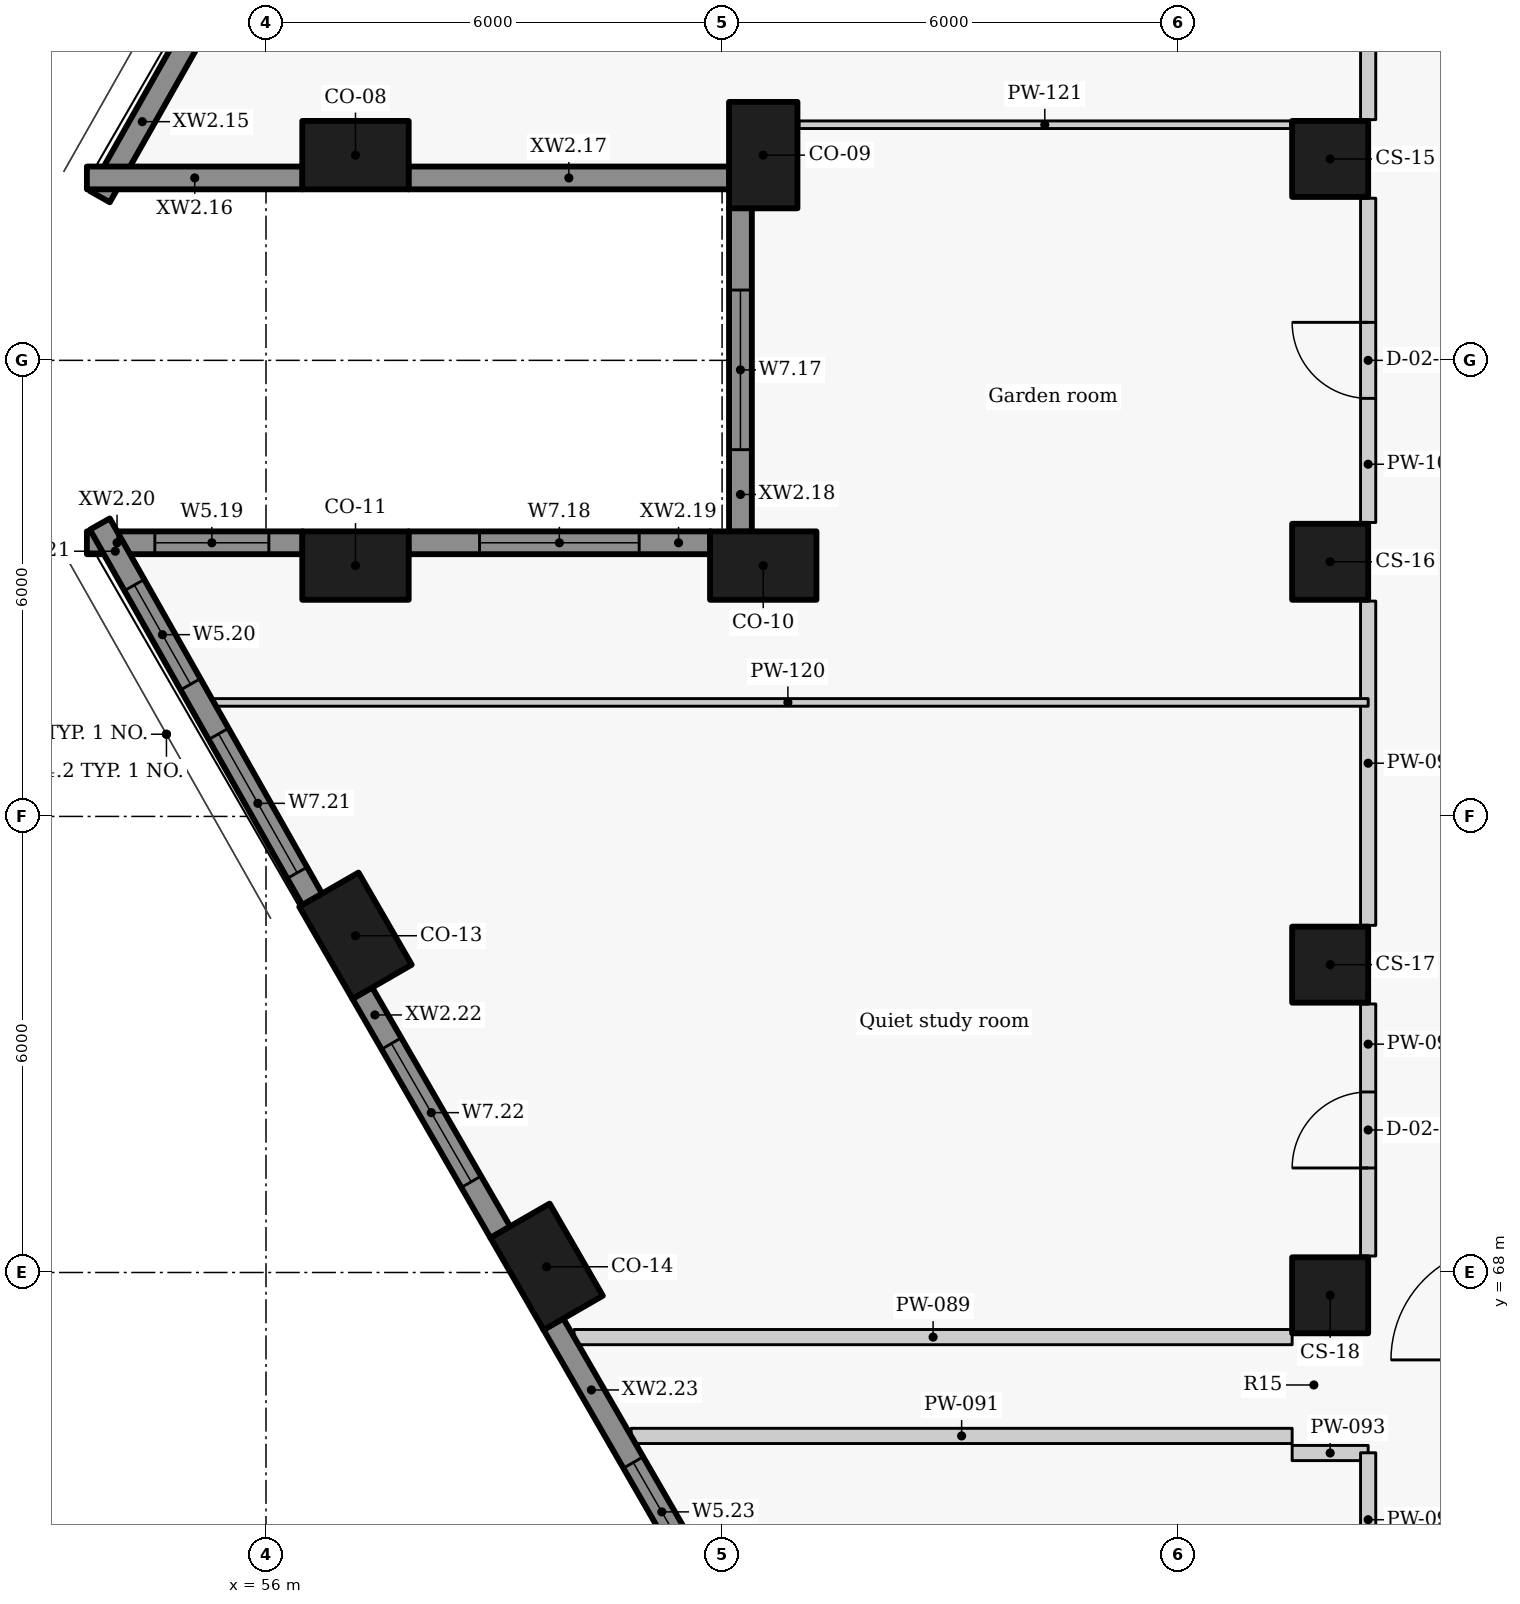
"""IFC4 building model, lengths in metres.
Left out: names, types, materials, properties, quantities, classifications, styles, units other than length and angle.
Written with IfcOpenShell. Run it as: python <this file> out.ifc"""

import sys

from ifc_helpers import new_model, si_unit, direction, frame, frame_2d, origin, origin_2d, place, context, subcontext, project, spatial, rectangle, extrude, element, fill, save


model = new_model("IFC4")
c1 = context("Model", 3, precision=1e-05, world=origin(), true_north=direction((0.0, 1.0)))
c2 = subcontext(c1, "Body", "Model", "MODEL_VIEW")
j1 = project(units=[si_unit("LENGTHUNIT", "METRE"), si_unit("PLANEANGLEUNIT", "RADIAN")], contexts=[c1])
p1 = place(None, origin())
s1 = spatial("IfcSite", under=j1, at=p1, CompositionType="ELEMENT")
p2 = place(p1, origin())
s2 = spatial("IfcBuilding", under=s1, at=p2, CompositionType="ELEMENT")
p3 = place(p2, frame((0.0, 0.0, 81.0)))
s3 = spatial("IfcBuildingStorey", under=s2, at=p3, CompositionType="ELEMENT", Elevation=81.0)
for number, where, z_axis, x_axis in (
    (1, (57.177, 82.7, 0.0), (0.0, 0.0, 1.0), (1.0, 0.0, 0.0)),
    (2, (62.542, 82.7, 0.0), (0.0, 0.0, 1.0), (0.0, -1.0, 0.0)),
    (3, (62.542, 77.3, 0.0), (0.0, 0.0, 1.0), (-1.0, 0.0, 0.0)),
    (4, (57.177, 77.3, 0.0), (0.0, 0.0, 1.0), (-1.0, 0.0, 0.0)),
    (5, (57.177, 72.43, 0.0), (0.0, 0.0, 1.0), (0.5, -0.866, 0.0)),
    (6, (59.692, 68.075, 0.0), (0.0, 0.0, 1.0), (0.5, -0.866, 0.0)),
):
    element("IfcColumn", number, at=place(p3, frame(where, z_axis=z_axis, x_axis=x_axis)), inside=s3, PredefinedType="COLUMN", context=c2, shape_type="SweptSolid", body=[
        extrude(rectangle(XDim=1.4, YDim=0.9, at=origin_2d()), origin(), (0.0, 0.0, 1.0), 3.3),
    ])
for number, where, z_axis, x_axis in (
    (7, (70.0, 82.65, 0.0), (0.0, 0.0, 1.0), (0.0, -1.0, 0.0)),
    (8, (70.0, 77.35, 0.0), (0.0, 0.0, 1.0), (0.0, -1.0, 0.0)),
    (9, (70.0, 72.05, 0.0), (0.0, 0.0, 1.0), (0.0, -1.0, 0.0)),
    (10, (70.0, 67.7, 0.0), (0.0, 0.0, 1.0), (0.0, -1.0, 0.0)),
):
    element("IfcColumn", number, at=place(p3, frame(where, z_axis=z_axis, x_axis=x_axis)), inside=s3, PredefinedType="COLUMN", context=c2, shape_type="SweptSolid", body=[
        extrude(rectangle(XDim=1.0, YDim=1.0, at=origin_2d()), origin(), (0.0, 0.0, 1.0), 3.3),
    ])
p4 = place(p3, frame((56.609, 87.094, 0.0), z_axis=(0.0, 0.0, 1.0), x_axis=(-0.492456858874, -0.870336855561, 0.0)))
e11 = element("IfcWall", 11, at=p4, inside=s3, PredefinedType="SOLIDWALL", context=c2, shape_type="SweptSolid", body=[
    extrude(rectangle(XDim=5.677, YDim=0.3, at=frame_2d((2.838, 0.0))), origin(), (0.0, 0.0, 1.0), 2.425),
])
p5 = place(p4, frame((1.209, 0.0, 0.9)))
e12 = element("IfcOpeningElement", 12, at=p5, cuts=e11, PredefinedType="OPENING", context=c2, shape_type="SweptSolid", body=[
    extrude(rectangle(XDim=2.1, YDim=1.1, at=frame_2d((1.05, 0.55))), frame((0.0, 0.16, 0.0), z_axis=(0.0, -1.0, 0.0), x_axis=(1.0, 0.0, 0.0)), (0.0, 0.0, 1.0), 0.32),
])
p6 = place(p3, frame((53.643, 82.4, 0.0), z_axis=(0.0, 0.0, 1.0), x_axis=(1.0, 0.0, 0.0)))
e13 = element("IfcWall", 13, at=p6, inside=s3, PredefinedType="SOLIDWALL", context=c2, shape_type="SweptSolid", body=[
    extrude(rectangle(XDim=2.838, YDim=0.3, at=frame_2d((1.419, 0.0))), origin(), (0.0, 0.0, 1.0), 2.425),
])
p7 = place(p3, frame((57.873, 82.4, 0.0), z_axis=(0.0, 0.0, 1.0), x_axis=(1.0, 0.0, 0.0)))
e14 = element("IfcWall", 14, at=p7, inside=s3, PredefinedType="SOLIDWALL", context=c2, shape_type="SweptSolid", body=[
    extrude(rectangle(XDim=4.223, YDim=0.3, at=frame_2d((2.111, 0.0))), origin(), (0.0, 0.0, 1.0), 2.425),
])
p8 = place(p3, frame((62.242, 82.004, 0.0), z_axis=(0.0, 0.0, 1.0), x_axis=(0.0, -1.0, 0.0)))
e15 = element("IfcWall", 15, at=p8, inside=s3, PredefinedType="SOLIDWALL", context=c2, shape_type="SweptSolid", body=[
    extrude(rectangle(XDim=4.258, YDim=0.3, at=frame_2d((2.129, 0.0))), origin(), (0.0, 0.0, 1.0), 2.425),
])
p9 = place(p8, frame((1.079, 0.0, 0.9)))
e16 = element("IfcOpeningElement", 16, at=p9, cuts=e15, PredefinedType="OPENING", context=c2, shape_type="SweptSolid", body=[
    extrude(rectangle(XDim=2.1, YDim=1.1, at=frame_2d((1.05, 0.55))), frame((0.0, 0.16, 0.0), z_axis=(0.0, -1.0, 0.0), x_axis=(1.0, 0.0, 0.0)), (0.0, 0.0, 1.0), 0.32),
])
p10 = place(p3, frame((61.846, 77.6, 0.0), z_axis=(0.0, 0.0, 1.0), x_axis=(-1.0, 0.0, 0.0)))
e17 = element("IfcWall", 17, at=p10, inside=s3, PredefinedType="SOLIDWALL", context=c2, shape_type="SweptSolid", body=[
    extrude(rectangle(XDim=3.973, YDim=0.3, at=frame_2d((1.986, 0.0))), origin(), (0.0, 0.0, 1.0), 2.425),
])
p11 = place(p10, frame((0.936, 0.0, 0.9)))
e18 = element("IfcOpeningElement", 18, at=p11, cuts=e17, PredefinedType="OPENING", context=c2, shape_type="SweptSolid", body=[
    extrude(rectangle(XDim=2.1, YDim=1.1, at=frame_2d((1.05, 0.55))), frame((0.0, 0.16, 0.0), z_axis=(0.0, -1.0, 0.0), x_axis=(1.0, 0.0, 0.0)), (0.0, 0.0, 1.0), 0.32),
])
p12 = place(p3, frame((56.481, 77.6, 0.0), z_axis=(0.0, 0.0, 1.0), x_axis=(-1.0, 0.0, 0.0)))
e19 = element("IfcWall", 19, at=p12, inside=s3, PredefinedType="SOLIDWALL", context=c2, shape_type="SweptSolid", body=[
    extrude(rectangle(XDim=2.838, YDim=0.3, at=frame_2d((1.419, 0.0))), origin(), (0.0, 0.0, 1.0), 2.425),
])
p13 = place(p12, frame((0.444, 0.0, 0.9)))
e20 = element("IfcOpeningElement", 20, at=p13, cuts=e19, PredefinedType="OPENING", context=c2, shape_type="SweptSolid", body=[
    extrude(rectangle(XDim=1.5, YDim=1.1, at=frame_2d((0.75, 0.55))), frame((0.0, 0.16, 0.0), z_axis=(0.0, -1.0, 0.0), x_axis=(1.0, 0.0, 0.0)), (0.0, 0.0, 1.0), 0.32),
])
p14 = place(p3, frame((53.814, 77.847, 0.0), z_axis=(0.0, 0.0, 1.0), x_axis=(0.492456858874, -0.870336855561, 0.0)))
e21 = element("IfcWall", 21, at=p14, inside=s3, PredefinedType="SOLIDWALL", context=c2, shape_type="SweptSolid", body=[
    extrude(rectangle(XDim=5.677, YDim=0.3, at=frame_2d((2.838, 0.0))), origin(), (0.0, 0.0, 1.0), 2.425),
])
p15 = place(p14, frame((0.922, 0.0, 0.9)))
e22 = element("IfcOpeningElement", 22, at=p15, cuts=e21, PredefinedType="OPENING", context=c2, shape_type="SweptSolid", body=[
    extrude(rectangle(XDim=1.5, YDim=1.1, at=frame_2d((0.75, 0.55))), frame((0.0, 0.16, 0.0), z_axis=(0.0, -1.0, 0.0), x_axis=(1.0, 0.0, 0.0)), (0.0, 0.0, 1.0), 0.32),
])
p16 = place(p14, frame((3.172, 0.0, 0.9)))
e23 = element("IfcOpeningElement", 23, at=p16, cuts=e21, PredefinedType="OPENING", context=c2, shape_type="SweptSolid", body=[
    extrude(rectangle(XDim=2.1, YDim=1.1, at=frame_2d((1.05, 0.55))), frame((0.0, 0.16, 0.0), z_axis=(0.0, -1.0, 0.0), x_axis=(1.0, 0.0, 0.0)), (0.0, 0.0, 1.0), 0.32),
])
p17 = place(p3, frame((57.265, 71.677, 0.0), z_axis=(0.0, 0.0, 1.0), x_axis=(0.500009139881, -0.866020126807, 0.0)))
e24 = element("IfcWall", 24, at=p17, inside=s3, PredefinedType="SOLIDWALL", context=c2, shape_type="SweptSolid", body=[
    extrude(rectangle(XDim=3.637, YDim=0.3, at=frame_2d((1.818, 0.0))), origin(), (0.0, 0.0, 1.0), 2.425),
])
p18 = place(p17, frame((0.768, 0.0, 0.9)))
e25 = element("IfcOpeningElement", 25, at=p18, cuts=e24, PredefinedType="OPENING", context=c2, shape_type="SweptSolid", body=[
    extrude(rectangle(XDim=2.1, YDim=1.1, at=frame_2d((1.05, 0.55))), frame((0.0, 0.16, 0.0), z_axis=(0.0, -1.0, 0.0), x_axis=(1.0, 0.0, 0.0)), (0.0, 0.0, 1.0), 0.32),
])
p19 = place(p3, frame((59.78, 67.323, 0.0), z_axis=(0.0, 0.0, 1.0), x_axis=(0.499957037901, -0.866050206543, 0.0)))
e26 = element("IfcWall", 26, at=p19, inside=s3, PredefinedType="SOLIDWALL", context=c2, shape_type="SweptSolid", body=[
    extrude(rectangle(XDim=3.934, YDim=0.3, at=frame_2d((1.967, 0.0))), origin(), (0.0, 0.0, 1.0), 2.425),
])
p20 = place(p19, frame((2.104, 0.0, 0.9)))
e27 = element("IfcOpeningElement", 27, at=p20, cuts=e26, PredefinedType="OPENING", context=c2, shape_type="SweptSolid", body=[
    extrude(rectangle(XDim=1.5, YDim=1.1, at=frame_2d((0.75, 0.55))), frame((0.0, 0.16, 0.0), z_axis=(0.0, -1.0, 0.0), x_axis=(1.0, 0.0, 0.0)), (0.0, 0.0, 1.0), 0.32),
])
p21 = place(p3, frame((60.052, 67.15, 0.0), z_axis=(0.0, 0.0, 1.0), x_axis=(1.0, 0.0, 0.0)))
e28 = element("IfcWall", 28, at=p21, inside=s3, PredefinedType="PARTITIONING", context=c2, shape_type="SweptSolid", body=[
    extrude(rectangle(XDim=9.448, YDim=0.2, at=frame_2d((4.724, 0.0))), origin(), (0.0, 0.0, 1.0), 2.405),
])
p22 = place(p3, frame((60.803, 65.85, 0.0), z_axis=(0.0, 0.0, 1.0), x_axis=(1.0, 0.0, 0.0)))
e29 = element("IfcWall", 29, at=p22, inside=s3, PredefinedType="PARTITIONING", context=c2, shape_type="SweptSolid", body=[
    extrude(rectangle(XDim=8.697, YDim=0.2, at=frame_2d((4.349, 0.0))), origin(), (0.0, 0.0, 1.0), 2.405),
])
p23 = place(p3, frame((69.5, 65.625, 0.0), z_axis=(0.0, 0.0, 1.0), x_axis=(1.0, 0.0, 0.0)))
e30 = element("IfcWall", 30, at=p23, inside=s3, PredefinedType="PARTITIONING", context=c2, shape_type="SweptSolid", body=[
    extrude(rectangle(XDim=1.0, YDim=0.2, at=frame_2d((0.5, 0.0))), origin(), (0.0, 0.0, 1.0), 2.505),
])
p24 = place(p3, frame((70.5, 63.867, 0.0), z_axis=(0.0, 0.0, 1.0), x_axis=(0.0, 1.0, 0.0)))
e31 = element("IfcWall", 31, at=p24, inside=s3, PredefinedType="PARTITIONING", context=c2, shape_type="SweptSolid", body=[
    extrude(rectangle(XDim=1.761, YDim=0.2, at=frame_2d((0.88, 0.0))), origin(), (0.0, 0.0, 1.0), 3.025),
])
p25 = place(p3, frame((70.5, 68.217, 0.0), z_axis=(0.0, 0.0, 1.0), x_axis=(0.0, 1.0, 0.0)))
e32 = element("IfcWall", 32, at=p25, inside=s3, PredefinedType="PARTITIONING", context=c2, shape_type="SweptSolid", body=[
    extrude(rectangle(XDim=3.316, YDim=0.2, at=frame_2d((1.658, 0.0))), origin(), (0.0, 0.0, 1.0), 3.025),
])
p26 = place(p25, frame((1.158, 0.0, 0.0)))
e33 = element("IfcOpeningElement", 33, at=p26, cuts=e32, PredefinedType="OPENING", context=c2, shape_type="SweptSolid", body=[
    extrude(rectangle(XDim=1.0, YDim=2.1, at=frame_2d((0.5, 1.05))), frame((0.0, 0.11, 0.0), z_axis=(0.0, -1.0, 0.0), x_axis=(1.0, 0.0, 0.0)), (0.0, 0.0, 1.0), 0.22),
])
p27 = place(p3, frame((70.5, 72.567, 0.0), z_axis=(0.0, 0.0, 1.0), x_axis=(0.0, 1.0, 0.0)))
e34 = element("IfcWall", 34, at=p27, inside=s3, PredefinedType="PARTITIONING", context=c2, shape_type="SweptSolid", body=[
    extrude(rectangle(XDim=4.266, YDim=0.2, at=frame_2d((2.133, 0.0))), origin(), (0.0, 0.0, 1.0), 3.025),
])
p28 = place(p3, frame((70.5, 77.867, 0.0), z_axis=(0.0, 0.0, 1.0), x_axis=(0.0, 1.0, 0.0)))
e35 = element("IfcWall", 35, at=p28, inside=s3, PredefinedType="PARTITIONING", context=c2, shape_type="SweptSolid", body=[
    extrude(rectangle(XDim=4.266, YDim=0.2, at=frame_2d((2.133, 0.0))), origin(), (0.0, 0.0, 1.0), 3.025),
])
p29 = place(p28, frame((1.633, 0.0, 0.0)))
e36 = element("IfcOpeningElement", 36, at=p29, cuts=e35, PredefinedType="OPENING", context=c2, shape_type="SweptSolid", body=[
    extrude(rectangle(XDim=1.0, YDim=2.1, at=frame_2d((0.5, 1.05))), frame((0.0, 0.11, 0.0), z_axis=(0.0, -1.0, 0.0), x_axis=(1.0, 0.0, 0.0)), (0.0, 0.0, 1.0), 0.22),
])
p30 = place(p3, frame((70.5, 83.167, 0.0), z_axis=(0.0, 0.0, 1.0), x_axis=(0.0, 1.0, 0.0)))
e37 = element("IfcWall", 37, at=p30, inside=s3, PredefinedType="PARTITIONING", context=c2, shape_type="SweptSolid", body=[
    extrude(rectangle(XDim=4.266, YDim=0.2, at=frame_2d((2.133, 0.0))), origin(), (0.0, 0.0, 1.0), 3.025),
])
p31 = place(p30, frame((1.633, 0.0, 0.0)))
e38 = element("IfcOpeningElement", 38, at=p31, cuts=e37, PredefinedType="OPENING", context=c2, shape_type="SweptSolid", body=[
    extrude(rectangle(XDim=1.0, YDim=2.1, at=frame_2d((0.5, 1.05))), frame((0.0, 0.11, 0.0), z_axis=(0.0, -1.0, 0.0), x_axis=(1.0, 0.0, 0.0)), (0.0, 0.0, 1.0), 0.22),
])
p32 = place(p3, frame((55.232, 75.5, 0.0), z_axis=(0.0, 0.0, 1.0), x_axis=(1.0, 0.0, 0.0)))
e39 = element("IfcWall", 39, at=p32, inside=s3, PredefinedType="PARTITIONING", context=c2, shape_type="SweptSolid", body=[
    extrude(rectangle(XDim=15.268, YDim=0.1, at=frame_2d((7.634, 0.0))), origin(), (0.0, 0.0, 1.0), 2.405),
])
p33 = place(p3, frame((63.012, 83.1, 0.0), z_axis=(0.0, 0.0, 1.0), x_axis=(1.0, 0.0, 0.0)))
e40 = element("IfcWall", 40, at=p33, inside=s3, PredefinedType="PARTITIONING", context=c2, shape_type="SweptSolid", body=[
    extrude(rectangle(XDim=6.468, YDim=0.1, at=frame_2d((3.234, 0.0))), origin(), (0.0, 0.0, 1.0), 3.025),
])
p34 = place(p9, origin())
e41 = element("IfcWindow", 41, at=p34, inside=s3, PartitioningType="SINGLE_PANEL", PredefinedType="WINDOW", context=c2, shape_type="SweptSolid", body=[
    extrude(rectangle(XDim=2.1, YDim=1.1, at=frame_2d((1.05, 0.55))), frame((0.0, 0.03, 0.0), z_axis=(0.0, -1.0, 0.0), x_axis=(1.0, 0.0, 0.0)), (0.0, 0.0, 1.0), 0.06),
])
fill(e16, e41)
p35 = place(p11, origin())
e42 = element("IfcWindow", 42, at=p35, inside=s3, PartitioningType="SINGLE_PANEL", PredefinedType="WINDOW", context=c2, shape_type="SweptSolid", body=[
    extrude(rectangle(XDim=2.1, YDim=1.1, at=frame_2d((1.05, 0.55))), frame((0.0, 0.03, 0.0), z_axis=(0.0, -1.0, 0.0), x_axis=(1.0, 0.0, 0.0)), (0.0, 0.0, 1.0), 0.06),
])
fill(e18, e42)
p36 = place(p13, origin())
e43 = element("IfcWindow", 43, at=p36, inside=s3, PartitioningType="SINGLE_PANEL", PredefinedType="WINDOW", context=c2, shape_type="SweptSolid", body=[
    extrude(rectangle(XDim=1.5, YDim=1.1, at=frame_2d((0.75, 0.55))), frame((0.0, 0.03, 0.0), z_axis=(0.0, -1.0, 0.0), x_axis=(1.0, 0.0, 0.0)), (0.0, 0.0, 1.0), 0.06),
])
fill(e20, e43)
p37 = place(p15, origin())
e44 = element("IfcWindow", 44, at=p37, inside=s3, PartitioningType="SINGLE_PANEL", PredefinedType="WINDOW", context=c2, shape_type="SweptSolid", body=[
    extrude(rectangle(XDim=1.5, YDim=1.1, at=frame_2d((0.75, 0.55))), frame((0.0, 0.03, 0.0), z_axis=(0.0, -1.0, 0.0), x_axis=(1.0, 0.0, 0.0)), (0.0, 0.0, 1.0), 0.06),
])
fill(e22, e44)
p38 = place(p16, origin())
e45 = element("IfcWindow", 45, at=p38, inside=s3, PartitioningType="SINGLE_PANEL", PredefinedType="WINDOW", context=c2, shape_type="SweptSolid", body=[
    extrude(rectangle(XDim=2.1, YDim=1.1, at=frame_2d((1.05, 0.55))), frame((0.0, 0.03, 0.0), z_axis=(0.0, -1.0, 0.0), x_axis=(1.0, 0.0, 0.0)), (0.0, 0.0, 1.0), 0.06),
])
fill(e23, e45)
p39 = place(p18, origin())
e46 = element("IfcWindow", 46, at=p39, inside=s3, PartitioningType="SINGLE_PANEL", PredefinedType="WINDOW", context=c2, shape_type="SweptSolid", body=[
    extrude(rectangle(XDim=2.1, YDim=1.1, at=frame_2d((1.05, 0.55))), frame((0.0, 0.03, 0.0), z_axis=(0.0, -1.0, 0.0), x_axis=(1.0, 0.0, 0.0)), (0.0, 0.0, 1.0), 0.06),
])
fill(e25, e46)
p40 = place(p20, origin())
e47 = element("IfcWindow", 47, at=p40, inside=s3, PartitioningType="SINGLE_PANEL", PredefinedType="WINDOW", context=c2, shape_type="SweptSolid", body=[
    extrude(rectangle(XDim=1.5, YDim=1.1, at=frame_2d((0.75, 0.55))), frame((0.0, 0.03, 0.0), z_axis=(0.0, -1.0, 0.0), x_axis=(1.0, 0.0, 0.0)), (0.0, 0.0, 1.0), 0.06),
])
fill(e27, e47)
p41 = place(p26, origin())
e48 = element("IfcDoor", 48, at=p41, inside=s3, OperationType="SINGLE_SWING_LEFT", PredefinedType="DOOR", context=c2, shape_type="SweptSolid", body=[
    extrude(rectangle(XDim=1.0, YDim=2.1, at=frame_2d((0.5, 1.05))), frame((0.0, 0.025, 0.0), z_axis=(0.0, -1.0, 0.0), x_axis=(1.0, 0.0, 0.0)), (0.0, 0.0, 1.0), 0.05),
])
fill(e33, e48)
p42 = place(p29, origin())
e49 = element("IfcDoor", 49, at=p42, inside=s3, OperationType="SINGLE_SWING_RIGHT", PredefinedType="DOOR", context=c2, shape_type="SweptSolid", body=[
    extrude(rectangle(XDim=1.0, YDim=2.1, at=frame_2d((0.5, 1.05))), frame((0.0, 0.025, 0.0), z_axis=(0.0, -1.0, 0.0), x_axis=(1.0, 0.0, 0.0)), (0.0, 0.0, 1.0), 0.05),
])
fill(e36, e49)
save(model, sys.argv[1])
